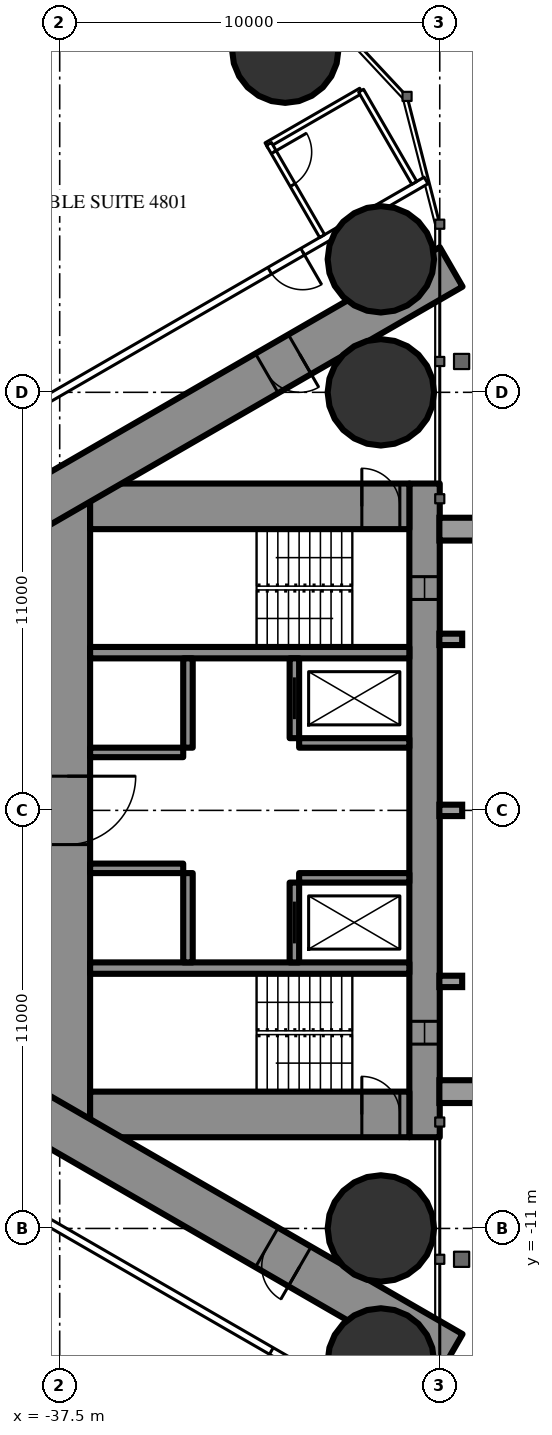
"""IFC4 building model, lengths in metres.
Left out: names, types, materials, properties, quantities, classifications, styles, units other than length and angle.
Written with IfcOpenShell. Run it as: python <this file> out.ifc"""

import sys

from ifc_helpers import new_model, si_unit, direction, frame, frame_2d, origin, origin_2d, place, context, subcontext, project, spatial, rectangle, circle, extrude, element, fill, save


model = new_model("IFC4")
c1 = context("Model", 3, precision=1e-05, world=origin(), true_north=direction((0.0, 1.0)))
c2 = subcontext(c1, "Body", "Model", "MODEL_VIEW")
j1 = project(units=[si_unit("LENGTHUNIT", "METRE"), si_unit("PLANEANGLEUNIT", "RADIAN")], contexts=[c1])
p1 = place(None, origin())
s1 = spatial("IfcSite", under=j1, at=p1, CompositionType="ELEMENT")
p2 = place(p1, origin())
s2 = spatial("IfcBuilding", under=s1, at=p2, CompositionType="ELEMENT")
p3 = place(p2, frame((0.0, 0.0, 180.8)))
s3 = spatial("IfcBuildingStorey", under=s2, at=p3, CompositionType="ELEMENT", Elevation=180.8)
for number, where, z_axis, x_axis in (
    (1, (-31.565, 20.016, 0.0), (0.0, 0.0, 1.0), (1.0, 0.0, 0.0)),
    (2, (-29.05, -11.0, 0.0), (0.0, 0.0, 1.0), (1.0, 0.0, 0.0)),
    (3, (-29.05, 11.0, 0.0), (0.0, 0.0, 1.0), (1.0, 0.0, 0.0)),
    (4, (-29.05, 14.5, 0.0), (0.0, 0.0, 1.0), (1.0, 0.0, 0.0)),
    (5, (-29.05, -14.5, 0.0), (0.0, 0.0, 1.0), (1.0, 0.0, 0.0)),
):
    element("IfcColumn", number, at=place(p3, frame(where, z_axis=z_axis, x_axis=x_axis)), inside=s3, PredefinedType="COLUMN", context=c2, shape_type="SweptSolid", body=[
        extrude(circle(Radius=1.4, at=origin_2d()), origin(), (0.0, 0.0, 1.0), 3.5),
    ])
p4 = place(p3, frame((-27.9, 8.6, 0.0), z_axis=(0.0, 0.0, 1.0), x_axis=(0.0, -1.0, 0.0)))
e6 = element("IfcWall", 6, at=p4, inside=s3, PredefinedType="SHEAR", context=c2, shape_type="SweptSolid", body=[
    extrude(rectangle(XDim=17.2, YDim=0.8, at=frame_2d((8.6, 0.0))), origin(), (0.0, 0.0, 1.0), 3.5),
])
p5 = place(p4, frame((2.45, 0.0, 0.6)))
e7 = element("IfcOpeningElement", 7, at=p5, cuts=e6, PredefinedType="OPENING", context=c2, shape_type="SweptSolid", body=[
    extrude(rectangle(XDim=0.6, YDim=2.1, at=frame_2d((0.3, 1.05))), frame((0.0, 0.41, 0.0), z_axis=(0.0, -1.0, 0.0), x_axis=(1.0, 0.0, 0.0)), (0.0, 0.0, 1.0), 0.82),
])
p6 = place(p4, frame((14.15, 0.0, 0.6)))
e8 = element("IfcOpeningElement", 8, at=p6, cuts=e6, PredefinedType="OPENING", context=c2, shape_type="SweptSolid", body=[
    extrude(rectangle(XDim=0.6, YDim=2.1, at=frame_2d((0.3, 1.05))), frame((0.0, 0.41, 0.0), z_axis=(0.0, -1.0, 0.0), x_axis=(1.0, 0.0, 0.0)), (0.0, 0.0, 1.0), 0.82),
])
p7 = place(p3, frame((-37.3, 8.6, 0.0), z_axis=(0.0, 0.0, 1.0), x_axis=(0.0, -1.0, 0.0)))
e9 = element("IfcWall", 9, at=p7, inside=s3, PredefinedType="SHEAR", context=c2, shape_type="SweptSolid", body=[
    extrude(rectangle(XDim=17.2, YDim=1.2, at=frame_2d((8.6, 0.0))), origin(), (0.0, 0.0, 1.0), 3.5),
])
p8 = place(p7, frame((7.7, 0.0, 0.0)))
e10 = element("IfcOpeningElement", 10, at=p8, cuts=e9, PredefinedType="OPENING", context=c2, shape_type="SweptSolid", body=[
    extrude(rectangle(XDim=1.8, YDim=2.2, at=frame_2d((0.9, 1.1))), frame((0.0, 0.61, 0.0), z_axis=(0.0, -1.0, 0.0), x_axis=(1.0, 0.0, 0.0)), (0.0, 0.0, 1.0), 1.22),
])
p9 = place(p3, frame((-28.3, 8.0, 0.0), z_axis=(0.0, 0.0, 1.0), x_axis=(-1.0, 0.0, 0.0)))
e11 = element("IfcWall", 11, at=p9, inside=s3, PredefinedType="SHEAR", context=c2, shape_type="SweptSolid", body=[
    extrude(rectangle(XDim=8.4, YDim=1.2, at=frame_2d((4.2, 0.0))), origin(), (0.0, 0.0, 1.0), 3.5),
])
p10 = place(p9, frame((0.25, 0.0, 0.0)))
e12 = element("IfcOpeningElement", 12, at=p10, cuts=e11, PredefinedType="OPENING", context=c2, shape_type="SweptSolid", body=[
    extrude(rectangle(XDim=1.0, YDim=2.2, at=frame_2d((0.5, 1.1))), frame((0.0, 0.61, 0.0), z_axis=(0.0, -1.0, 0.0), x_axis=(1.0, 0.0, 0.0)), (0.0, 0.0, 1.0), 1.22),
])
p11 = place(p3, frame((-28.3, -8.0, 0.0), z_axis=(0.0, 0.0, 1.0), x_axis=(-1.0, 0.0, 0.0)))
e13 = element("IfcWall", 13, at=p11, inside=s3, PredefinedType="SHEAR", context=c2, shape_type="SweptSolid", body=[
    extrude(rectangle(XDim=8.4, YDim=1.2, at=frame_2d((4.2, 0.0))), origin(), (0.0, 0.0, 1.0), 3.5),
])
p12 = place(p11, frame((0.25, 0.0, 0.0)))
e14 = element("IfcOpeningElement", 14, at=p12, cuts=e13, PredefinedType="OPENING", context=c2, shape_type="SweptSolid", body=[
    extrude(rectangle(XDim=1.0, YDim=2.2, at=frame_2d((0.5, 1.1))), frame((0.0, 0.61, 0.0), z_axis=(0.0, -1.0, 0.0), x_axis=(1.0, 0.0, 0.0)), (0.0, 0.0, 1.0), 1.22),
])
for number, where, z_axis, x_axis in (
    (15, (-28.3, 4.15, 0.0), (0.0, 0.0, 1.0), (-1.0, 0.0, 0.0)),
    (16, (-28.3, -4.15, 0.0), (0.0, 0.0, 1.0), (-1.0, 0.0, 0.0)),
):
    element("IfcWall", number, at=place(p3, frame(where, z_axis=z_axis, x_axis=x_axis)), inside=s3, PredefinedType="SHEAR", context=c2, shape_type="SweptSolid", body=[
        extrude(rectangle(XDim=8.4, YDim=0.3, at=frame_2d((4.2, 0.0))), origin(), (0.0, 0.0, 1.0), 3.5),
    ])
p13 = place(p3, frame((-31.325, 4.0, 0.0), z_axis=(0.0, 0.0, 1.0), x_axis=(0.0, -1.0, 0.0)))
e17 = element("IfcWall", 17, at=p13, inside=s3, PredefinedType="SHEAR", context=c2, shape_type="SweptSolid", body=[
    extrude(rectangle(XDim=2.1, YDim=0.25, at=frame_2d((1.05, 0.0))), origin(), (0.0, 0.0, 1.0), 3.5),
])
p14 = place(p13, frame((0.5, 0.0, 0.0)))
e18 = element("IfcOpeningElement", 18, at=p14, cuts=e17, PredefinedType="OPENING", context=c2, shape_type="SweptSolid", body=[
    extrude(rectangle(XDim=1.1, YDim=2.2, at=frame_2d((0.55, 1.1))), frame((0.0, 0.135, 0.0), z_axis=(0.0, -1.0, 0.0), x_axis=(1.0, 0.0, 0.0)), (0.0, 0.0, 1.0), 0.27),
])
p15 = place(p3, frame((-34.125, 4.0, 0.0), z_axis=(0.0, 0.0, 1.0), x_axis=(0.0, -1.0, 0.0)))
e19 = element("IfcWall", 19, at=p15, inside=s3, PredefinedType="SHEAR", context=c2, shape_type="SweptSolid", body=[
    extrude(rectangle(XDim=2.35, YDim=0.25, at=frame_2d((1.175, 0.0))), origin(), (0.0, 0.0, 1.0), 3.5),
])
p16 = place(p3, frame((-28.3, 1.775, 0.0), z_axis=(0.0, 0.0, 1.0), x_axis=(-1.0, 0.0, 0.0)))
e20 = element("IfcWall", 20, at=p16, inside=s3, PredefinedType="SHEAR", context=c2, shape_type="SweptSolid", body=[
    extrude(rectangle(XDim=2.9, YDim=0.25, at=frame_2d((1.45, 0.0))), origin(), (0.0, 0.0, 1.0), 3.5),
])
p17 = place(p3, frame((-34.25, 1.525, 0.0), z_axis=(0.0, 0.0, 1.0), x_axis=(-1.0, 0.0, 0.0)))
e21 = element("IfcWall", 21, at=p17, inside=s3, PredefinedType="SHEAR", context=c2, shape_type="SweptSolid", body=[
    extrude(rectangle(XDim=2.45, YDim=0.25, at=frame_2d((1.225, 0.0))), origin(), (0.0, 0.0, 1.0), 3.5),
])
p18 = place(p3, frame((-31.325, -1.9, 0.0), z_axis=(0.0, 0.0, 1.0), x_axis=(0.0, -1.0, 0.0)))
e22 = element("IfcWall", 22, at=p18, inside=s3, PredefinedType="SHEAR", context=c2, shape_type="SweptSolid", body=[
    extrude(rectangle(XDim=2.1, YDim=0.25, at=frame_2d((1.05, 0.0))), origin(), (0.0, 0.0, 1.0), 3.5),
])
p19 = place(p18, frame((0.5, 0.0, 0.0)))
e23 = element("IfcOpeningElement", 23, at=p19, cuts=e22, PredefinedType="OPENING", context=c2, shape_type="SweptSolid", body=[
    extrude(rectangle(XDim=1.1, YDim=2.2, at=frame_2d((0.55, 1.1))), frame((0.0, 0.135, 0.0), z_axis=(0.0, -1.0, 0.0), x_axis=(1.0, 0.0, 0.0)), (0.0, 0.0, 1.0), 0.27),
])
p20 = place(p3, frame((-34.125, -1.65, 0.0), z_axis=(0.0, 0.0, 1.0), x_axis=(0.0, -1.0, 0.0)))
e24 = element("IfcWall", 24, at=p20, inside=s3, PredefinedType="SHEAR", context=c2, shape_type="SweptSolid", body=[
    extrude(rectangle(XDim=2.35, YDim=0.25, at=frame_2d((1.175, 0.0))), origin(), (0.0, 0.0, 1.0), 3.5),
])
p21 = place(p3, frame((-28.3, -1.775, 0.0), z_axis=(0.0, 0.0, 1.0), x_axis=(-1.0, 0.0, 0.0)))
e25 = element("IfcWall", 25, at=p21, inside=s3, PredefinedType="SHEAR", context=c2, shape_type="SweptSolid", body=[
    extrude(rectangle(XDim=2.9, YDim=0.25, at=frame_2d((1.45, 0.0))), origin(), (0.0, 0.0, 1.0), 3.5),
])
p22 = place(p3, frame((-34.25, -1.525, 0.0), z_axis=(0.0, 0.0, 1.0), x_axis=(-1.0, 0.0, 0.0)))
e26 = element("IfcWall", 26, at=p22, inside=s3, PredefinedType="SHEAR", context=c2, shape_type="SweptSolid", body=[
    extrude(rectangle(XDim=2.45, YDim=0.25, at=frame_2d((1.225, 0.0))), origin(), (0.0, 0.0, 1.0), 3.5),
])
p23 = place(p3, frame((-27.2, 14.3, 0.0), z_axis=(0.0, 0.0, 1.0), x_axis=(-0.866026593062, -0.499997940104, 0.0)))
e27 = element("IfcWall", 27, at=p23, inside=s3, PredefinedType="SHEAR", context=c2, shape_type="SweptSolid", body=[
    extrude(rectangle(XDim=28.946, YDim=1.2, at=frame_2d((14.473, 0.0))), origin(), (0.0, 0.0, 1.0), 3.5),
])
p24 = place(p23, frame((4.6, 0.0, 0.0)))
e28 = element("IfcOpeningElement", 28, at=p24, cuts=e27, PredefinedType="OPENING", context=c2, shape_type="SweptSolid", body=[
    extrude(rectangle(XDim=1.0, YDim=2.2, at=frame_2d((0.5, 1.1))), frame((0.0, 0.61, 0.0), z_axis=(0.0, -1.0, 0.0), x_axis=(1.0, 0.0, 0.0)), (0.0, 0.0, 1.0), 1.22),
])
p25 = place(p23, frame((13.395, 0.0, 0.0)))
e29 = element("IfcOpeningElement", 29, at=p25, cuts=e27, PredefinedType="OPENING", context=c2, shape_type="SweptSolid", body=[
    extrude(rectangle(XDim=1.8, YDim=2.2, at=frame_2d((0.9, 1.1))), frame((0.0, 0.61, 0.0), z_axis=(0.0, -1.0, 0.0), x_axis=(1.0, 0.0, 0.0)), (0.0, 0.0, 1.0), 1.22),
])
p26 = place(p3, frame((-27.2, -14.3, 0.0), z_axis=(0.0, 0.0, 1.0), x_axis=(-0.866024021859, 0.500002393557, 0.0)))
e30 = element("IfcWall", 30, at=p26, inside=s3, PredefinedType="SHEAR", context=c2, shape_type="SweptSolid", body=[
    extrude(rectangle(XDim=27.907, YDim=1.2, at=frame_2d((13.954, 0.0))), origin(), (0.0, 0.0, 1.0), 3.5),
])
p27 = place(p26, frame((4.6, 0.0, 0.0)))
e31 = element("IfcOpeningElement", 31, at=p27, cuts=e30, PredefinedType="OPENING", context=c2, shape_type="SweptSolid", body=[
    extrude(rectangle(XDim=1.0, YDim=2.2, at=frame_2d((0.5, 1.1))), frame((0.0, 0.61, 0.0), z_axis=(0.0, -1.0, 0.0), x_axis=(1.0, 0.0, 0.0)), (0.0, 0.0, 1.0), 1.22),
])
p28 = place(p26, frame((13.395, 0.0, 0.0)))
e32 = element("IfcOpeningElement", 32, at=p28, cuts=e30, PredefinedType="OPENING", context=c2, shape_type="SweptSolid", body=[
    extrude(rectangle(XDim=1.8, YDim=2.2, at=frame_2d((0.9, 1.1))), frame((0.0, 0.61, 0.0), z_axis=(0.0, -1.0, 0.0), x_axis=(1.0, 0.0, 0.0)), (0.0, 0.0, 1.0), 1.22),
])
p29 = place(p3, frame((-27.86, -16.575, 0.0), z_axis=(0.0, 0.0, 1.0), x_axis=(-0.866027756871, 0.499995924312, 0.0)))
e33 = element("IfcWall", 33, at=p29, inside=s3, PredefinedType="PARTITIONING", context=c2, shape_type="SweptSolid", body=[
    extrude(rectangle(XDim=12.622, YDim=0.2, at=frame_2d((6.311, 0.0))), origin(), (0.0, 0.0, 1.0), 3.25),
])
p30 = place(p29, frame((3.75, 0.0, 0.0)))
e34 = element("IfcOpeningElement", 34, at=p30, cuts=e33, PredefinedType="OPENING", context=c2, shape_type="SweptSolid", body=[
    extrude(rectangle(XDim=0.95, YDim=2.2, at=frame_2d((0.475, 1.1))), frame((0.0, 0.11, 0.0), z_axis=(0.0, -1.0, 0.0), x_axis=(1.0, 0.0, 0.0)), (0.0, 0.0, 1.0), 0.22),
])
p31 = place(p3, frame((-27.86, 16.575, 0.0), z_axis=(0.0, 0.0, 1.0), x_axis=(-0.866026850238, -0.499997494661, 0.0)))
e35 = element("IfcWall", 35, at=p31, inside=s3, PredefinedType="PARTITIONING", context=c2, shape_type="SweptSolid", body=[
    extrude(rectangle(XDim=13.651, YDim=0.2, at=frame_2d((6.826, 0.0))), origin(), (0.0, 0.0, 1.0), 3.25),
])
p32 = place(p31, frame((3.75, 0.0, 0.0)))
e36 = element("IfcOpeningElement", 36, at=p32, cuts=e35, PredefinedType="OPENING", context=c2, shape_type="SweptSolid", body=[
    extrude(rectangle(XDim=1.0, YDim=2.2, at=frame_2d((0.5, 1.1))), frame((0.0, 0.11, 0.0), z_axis=(0.0, -1.0, 0.0), x_axis=(1.0, 0.0, 0.0)), (0.0, 0.0, 1.0), 0.22),
])
p33 = place(p3, frame((-29.57, 18.936, 0.0), z_axis=(0.0, 0.0, 1.0), x_axis=(-0.866018712932, -0.500011588718, 0.0)))
e37 = element("IfcWall", 37, at=p33, inside=s3, PredefinedType="PARTITIONING", context=c2, shape_type="SweptSolid", body=[
    extrude(rectangle(XDim=2.875, YDim=0.15, at=frame_2d((1.438, 0.0))), origin(), (0.0, 0.0, 1.0), 3.25),
])
p34 = place(p3, frame((-30.595, 15.111, 0.0), z_axis=(0.0, 0.0, 1.0), x_axis=(-0.49998411664, 0.866034573852, 0.0)))
e38 = element("IfcWall", 38, at=p34, inside=s3, PredefinedType="PARTITIONING", context=c2, shape_type="SweptSolid", body=[
    extrude(rectangle(XDim=2.8, YDim=0.15, at=frame_2d((1.4, 0.0))), origin(), (0.0, 0.0, 1.0), 3.25),
])
p35 = place(p34, frame((1.55, 0.0, 0.0)))
e39 = element("IfcOpeningElement", 39, at=p35, cuts=e38, PredefinedType="OPENING", context=c2, shape_type="SweptSolid", body=[
    extrude(rectangle(XDim=1.0, YDim=2.2, at=frame_2d((0.5, 1.1))), frame((0.0, 0.085, 0.0), z_axis=(0.0, -1.0, 0.0), x_axis=(1.0, 0.0, 0.0)), (0.0, 0.0, 1.0), 0.17),
])
p36 = place(p3, frame((-28.17, 16.511, 0.0), z_axis=(0.0, 0.0, 1.0), x_axis=(-0.49994636267, 0.866056369097, 0.0)))
e40 = element("IfcWall", 40, at=p36, inside=s3, PredefinedType="PARTITIONING", context=c2, shape_type="SweptSolid", body=[
    extrude(rectangle(XDim=2.8, YDim=0.15, at=frame_2d((1.4, 0.0))), origin(), (0.0, 0.0, 1.0), 3.25),
])
p37 = place(p35, origin())
e41 = element("IfcDoor", 41, at=p37, inside=s3, OperationType="SINGLE_SWING_RIGHT", PredefinedType="DOOR", context=c2, shape_type="SweptSolid", body=[
    extrude(rectangle(XDim=1.0, YDim=2.2, at=frame_2d((0.5, 1.1))), frame((0.0, 0.025, 0.0), z_axis=(0.0, -1.0, 0.0), x_axis=(1.0, 0.0, 0.0)), (0.0, 0.0, 1.0), 0.05),
])
fill(e39, e41)
p38 = place(p32, origin())
e42 = element("IfcDoor", 42, at=p38, inside=s3, OperationType="SINGLE_SWING_LEFT", PredefinedType="DOOR", context=c2, shape_type="SweptSolid", body=[
    extrude(rectangle(XDim=1.0, YDim=2.2, at=frame_2d((0.5, 1.1))), frame((0.0, 0.025, 0.0), z_axis=(0.0, -1.0, 0.0), x_axis=(1.0, 0.0, 0.0)), (0.0, 0.0, 1.0), 0.05),
])
fill(e36, e42)
p39 = place(p30, origin())
e43 = element("IfcDoor", 43, at=p39, inside=s3, OperationType="SINGLE_SWING_LEFT", PredefinedType="DOOR", context=c2, shape_type="SweptSolid", body=[
    extrude(rectangle(XDim=0.95, YDim=2.2, at=frame_2d((0.475, 1.1))), frame((0.0, 0.025, 0.0), z_axis=(0.0, -1.0, 0.0), x_axis=(1.0, 0.0, 0.0)), (0.0, 0.0, 1.0), 0.05),
])
fill(e34, e43)
p40 = place(p24, origin())
e44 = element("IfcDoor", 44, at=p40, inside=s3, OperationType="SINGLE_SWING_LEFT", PredefinedType="DOOR", context=c2, shape_type="SweptSolid", body=[
    extrude(rectangle(XDim=1.0, YDim=2.2, at=frame_2d((0.5, 1.1))), frame((0.0, 0.025, 0.0), z_axis=(0.0, -1.0, 0.0), x_axis=(1.0, 0.0, 0.0)), (0.0, 0.0, 1.0), 0.05),
])
fill(e28, e44)
p41 = place(p27, origin())
e45 = element("IfcDoor", 45, at=p41, inside=s3, OperationType="SINGLE_SWING_LEFT", PredefinedType="DOOR", context=c2, shape_type="SweptSolid", body=[
    extrude(rectangle(XDim=1.0, YDim=2.2, at=frame_2d((0.5, 1.1))), frame((0.0, 0.025, 0.0), z_axis=(0.0, -1.0, 0.0), x_axis=(1.0, 0.0, 0.0)), (0.0, 0.0, 1.0), 0.05),
])
fill(e31, e45)
p42 = place(p8, origin())
e46 = element("IfcDoor", 46, at=p42, inside=s3, OperationType="DOUBLE_DOOR_SINGLE_SWING", PredefinedType="DOOR", context=c2, shape_type="SweptSolid", body=[
    extrude(rectangle(XDim=1.8, YDim=2.2, at=frame_2d((0.9, 1.1))), frame((0.0, 0.025, 0.0), z_axis=(0.0, -1.0, 0.0), x_axis=(1.0, 0.0, 0.0)), (0.0, 0.0, 1.0), 0.05),
])
fill(e10, e46)
p43 = place(p10, origin())
e47 = element("IfcDoor", 47, at=p43, inside=s3, OperationType="SINGLE_SWING_RIGHT", PredefinedType="DOOR", context=c2, shape_type="SweptSolid", body=[
    extrude(rectangle(XDim=1.0, YDim=2.2, at=frame_2d((0.5, 1.1))), frame((0.0, 0.025, 0.0), z_axis=(0.0, -1.0, 0.0), x_axis=(1.0, 0.0, 0.0)), (0.0, 0.0, 1.0), 0.05),
])
fill(e12, e47)
p44 = place(p12, origin())
e48 = element("IfcDoor", 48, at=p44, inside=s3, OperationType="SINGLE_SWING_RIGHT", PredefinedType="DOOR", context=c2, shape_type="SweptSolid", body=[
    extrude(rectangle(XDim=1.0, YDim=2.2, at=frame_2d((0.5, 1.1))), frame((0.0, 0.025, 0.0), z_axis=(0.0, -1.0, 0.0), x_axis=(1.0, 0.0, 0.0)), (0.0, 0.0, 1.0), 0.05),
])
fill(e14, e48)
p45 = place(p14, origin())
e49 = element("IfcDoor", 49, at=p45, inside=s3, OperationType="SLIDING_TO_LEFT", PredefinedType="USERDEFINED", context=c2, shape_type="SweptSolid", body=[
    extrude(rectangle(XDim=1.1, YDim=2.2, at=frame_2d((0.55, 1.1))), frame((0.0, 0.025, 0.0), z_axis=(0.0, -1.0, 0.0), x_axis=(1.0, 0.0, 0.0)), (0.0, 0.0, 1.0), 0.05),
])
fill(e18, e49)
p46 = place(p19, origin())
e50 = element("IfcDoor", 50, at=p46, inside=s3, OperationType="SLIDING_TO_LEFT", PredefinedType="USERDEFINED", context=c2, shape_type="SweptSolid", body=[
    extrude(rectangle(XDim=1.1, YDim=2.2, at=frame_2d((0.55, 1.1))), frame((0.0, 0.025, 0.0), z_axis=(0.0, -1.0, 0.0), x_axis=(1.0, 0.0, 0.0)), (0.0, 0.0, 1.0), 0.05),
])
fill(e23, e50)
p47 = place(p5, origin())
e51 = element("IfcWindow", 51, at=p47, inside=s3, PartitioningType="SINGLE_PANEL", PredefinedType="WINDOW", context=c2, shape_type="SweptSolid", body=[
    extrude(rectangle(XDim=0.6, YDim=2.1, at=frame_2d((0.3, 1.05))), frame((0.0, 0.03, 0.0), z_axis=(0.0, -1.0, 0.0), x_axis=(1.0, 0.0, 0.0)), (0.0, 0.0, 1.0), 0.06),
])
fill(e7, e51)
p48 = place(p6, origin())
e52 = element("IfcWindow", 52, at=p48, inside=s3, PartitioningType="SINGLE_PANEL", PredefinedType="WINDOW", context=c2, shape_type="SweptSolid", body=[
    extrude(rectangle(XDim=0.6, YDim=2.1, at=frame_2d((0.3, 1.05))), frame((0.0, 0.03, 0.0), z_axis=(0.0, -1.0, 0.0), x_axis=(1.0, 0.0, 0.0)), (0.0, 0.0, 1.0), 0.06),
])
fill(e8, e52)
save(model, sys.argv[1])
